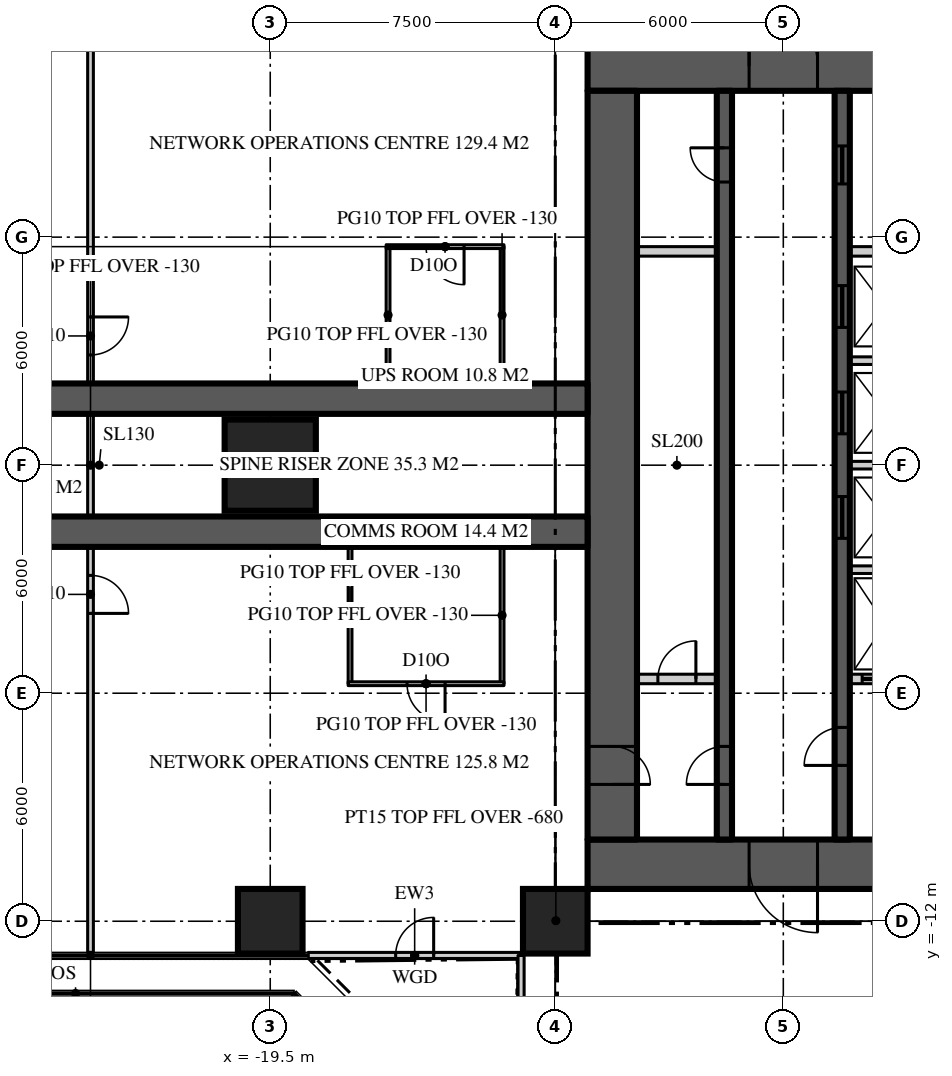
"""IFC4 building model, lengths in metres.
Left out: names, types, materials, properties, quantities, classifications, styles, units other than length and angle.
Written with IfcOpenShell. Run it as: python <this file> out.ifc"""

import sys

from ifc_helpers import new_model, si_unit, direction, frame, frame_2d, origin, origin_2d, place, context, subcontext, project, spatial, rectangle, extrude, element, fill, save


model = new_model("IFC4")
c1 = context("Model", 3, precision=1e-05, world=origin(), true_north=direction((0.0, 1.0)))
c2 = subcontext(c1, "Body", "Model", "MODEL_VIEW")
j1 = project(units=[si_unit("LENGTHUNIT", "METRE"), si_unit("PLANEANGLEUNIT", "RADIAN")], contexts=[c1])
p1 = place(None, origin())
s1 = spatial("IfcSite", under=j1, at=p1, CompositionType="ELEMENT")
p2 = place(p1, origin())
s2 = spatial("IfcBuilding", under=s1, at=p2, CompositionType="ELEMENT")
p3 = place(p2, frame((0.0, 0.0, 155.4)))
s3 = spatial("IfcBuildingStorey", under=s2, at=p3, CompositionType="ELEMENT", Elevation=155.4)
p4 = place(p3, frame((-11.15, 10.5, 0.0), z_axis=(0.0, 0.0, 1.0), x_axis=(1.0, 0.0, 0.0)))
e1 = element("IfcWall", 1, at=p4, inside=s3, PredefinedType="SHEAR", context=c2, shape_type="SweptSolid", body=[
    extrude(rectangle(XDim=22.3, YDim=1.3, at=frame_2d((11.15, 0.0))), origin(), (0.0, 0.0, 1.0), 3.9),
])
p5 = place(p4, frame((4.25, 0.0, 0.0)))
e2 = element("IfcOpeningElement", 2, at=p5, cuts=e1, PredefinedType="OPENING", context=c2, shape_type="SweptSolid", body=[
    extrude(rectangle(XDim=1.8, YDim=2.2, at=frame_2d((0.9, 1.1))), frame((0.0, 0.66, 0.0), z_axis=(0.0, -1.0, 0.0), x_axis=(1.0, 0.0, 0.0)), (0.0, 0.0, 1.0), 1.32),
])
p6 = place(p4, frame((16.25, 0.0, 0.0)))
e3 = element("IfcOpeningElement", 3, at=p6, cuts=e1, PredefinedType="OPENING", context=c2, shape_type="SweptSolid", body=[
    extrude(rectangle(XDim=1.8, YDim=2.2, at=frame_2d((0.9, 1.1))), frame((0.0, 0.66, 0.0), z_axis=(0.0, -1.0, 0.0), x_axis=(1.0, 0.0, 0.0)), (0.0, 0.0, 1.0), 1.32),
])
p7 = place(p3, frame((11.15, -10.5, 0.0), z_axis=(0.0, 0.0, 1.0), x_axis=(-1.0, 0.0, 0.0)))
e4 = element("IfcWall", 4, at=p7, inside=s3, PredefinedType="SHEAR", context=c2, shape_type="SweptSolid", body=[
    extrude(rectangle(XDim=22.3, YDim=1.3, at=frame_2d((11.15, 0.0))), origin(), (0.0, 0.0, 1.0), 3.9),
])
p8 = place(p7, frame((16.25, 0.0, 0.0)))
e5 = element("IfcOpeningElement", 5, at=p8, cuts=e4, PredefinedType="OPENING", context=c2, shape_type="SweptSolid", body=[
    extrude(rectangle(XDim=1.8, YDim=2.2, at=frame_2d((0.9, 1.1))), frame((0.0, 0.66, 0.0), z_axis=(0.0, -1.0, 0.0), x_axis=(1.0, 0.0, 0.0)), (0.0, 0.0, 1.0), 1.32),
])
p9 = place(p7, frame((4.25, 0.0, 0.0)))
e6 = element("IfcOpeningElement", 6, at=p9, cuts=e4, PredefinedType="OPENING", context=c2, shape_type="SweptSolid", body=[
    extrude(rectangle(XDim=1.8, YDim=2.2, at=frame_2d((0.9, 1.1))), frame((0.0, 0.66, 0.0), z_axis=(0.0, -1.0, 0.0), x_axis=(1.0, 0.0, 0.0)), (0.0, 0.0, 1.0), 1.32),
])
p10 = place(p3, frame((-10.5, 9.85, 0.0), z_axis=(0.0, 0.0, 1.0), x_axis=(0.0, -1.0, 0.0)))
e7 = element("IfcWall", 7, at=p10, inside=s3, PredefinedType="SHEAR", context=c2, shape_type="SweptSolid", body=[
    extrude(rectangle(XDim=19.7, YDim=1.3, at=frame_2d((9.85, 0.0))), origin(), (0.0, 0.0, 1.0), 3.9),
])
p11 = place(p10, frame((17.25, 0.0, 0.0)))
e8 = element("IfcOpeningElement", 8, at=p11, cuts=e7, PredefinedType="OPENING", context=c2, shape_type="SweptSolid", body=[
    extrude(rectangle(XDim=1.0, YDim=2.2, at=frame_2d((0.5, 1.1))), frame((0.0, 0.66, 0.0), z_axis=(0.0, -1.0, 0.0), x_axis=(1.0, 0.0, 0.0)), (0.0, 0.0, 1.0), 1.32),
])
for number, where, z_axis, x_axis in (
    (9, (-11.15, 1.75, 0.0), (0.0, 0.0, 1.0), (-1.0, 0.0, 0.0)),
    (10, (-11.15, -1.75, 0.0), (0.0, 0.0, 1.0), (-1.0, 0.0, 0.0)),
):
    element("IfcWall", number, at=place(p3, frame(where, z_axis=z_axis, x_axis=x_axis)), inside=s3, PredefinedType="SHEAR", context=c2, shape_type="SweptSolid", body=[
        extrude(rectangle(XDim=15.25, YDim=0.8, at=frame_2d((7.625, 0.0))), origin(), (0.0, 0.0, 1.0), 3.9),
    ])
for number, where, z_axis, x_axis in (
    (11, (-19.5, -12.0, 0.0), (0.0, 0.0, 1.0), (1.0, 0.0, 0.0)),
    (12, (-12.0, -12.0, 0.0), (0.0, 0.0, 1.0), (1.0, 0.0, 0.0)),
):
    element("IfcColumn", number, at=place(p3, frame(where, z_axis=z_axis, x_axis=x_axis)), inside=s3, PredefinedType="COLUMN", context=c2, shape_type="SweptSolid", body=[
        extrude(rectangle(XDim=1.7, YDim=1.7, at=origin_2d()), origin(), (0.0, 0.0, 1.0), 3.9),
    ])
p12 = place(p3, frame((-19.5, 0.0, 0.0), z_axis=(0.0, 0.0, 1.0), x_axis=(1.0, 0.0, 0.0)))
e13 = element("IfcColumn", 13, at=p12, inside=s3, PredefinedType="COLUMN", context=c2, shape_type="SweptSolid", body=[
    extrude(rectangle(XDim=2.4, YDim=2.4, at=origin_2d()), origin(), (0.0, 0.0, 1.0), 3.9),
])
p13 = place(p3, frame((-18.5, -12.9, 0.0), z_axis=(0.0, 0.0, 1.0), x_axis=(1.0, 0.0, 0.0)))
e14 = element("IfcWall", 14, at=p13, inside=s3, PredefinedType="SOLIDWALL", context=c2, shape_type="SweptSolid", body=[
    extrude(rectangle(XDim=5.6, YDim=0.16, at=frame_2d((2.8, 0.0))), origin(), (0.0, 0.0, 1.0), 3.77),
])
p14 = place(p13, frame((2.3, 0.0, 0.0)))
e15 = element("IfcOpeningElement", 15, at=p14, cuts=e14, PredefinedType="OPENING", context=c2, shape_type="SweptSolid", body=[
    extrude(rectangle(XDim=1.0, YDim=2.2, at=frame_2d((0.5, 1.1))), frame((0.0, 0.09, 0.0), z_axis=(0.0, -1.0, 0.0), x_axis=(1.0, 0.0, 0.0)), (0.0, 0.0, 1.0), 0.18),
])
p15 = place(p3, frame((-12.9, -12.9, 0.0), z_axis=(0.0, 0.0, 1.0), x_axis=(0.0, -1.0, 0.0)))
e16 = element("IfcWall", 16, at=p15, inside=s3, PredefinedType="SOLIDWALL", context=c2, shape_type="SweptSolid", body=[
    extrude(rectangle(XDim=5.6, YDim=0.16, at=frame_2d((2.8, 0.0))), origin(), (0.0, 0.0, 1.0), 3.77),
])
p16 = place(p3, frame((-7.55, -9.85, 0.0), z_axis=(0.0, 0.0, 1.0), x_axis=(0.0, 1.0, 0.0)))
e17 = element("IfcWall", 17, at=p16, inside=s3, PredefinedType="SHEAR", context=c2, shape_type="SweptSolid", body=[
    extrude(rectangle(XDim=19.7, YDim=0.4, at=frame_2d((9.85, 0.0))), origin(), (0.0, 0.0, 1.0), 3.9),
])
p17 = place(p16, frame((1.45, 0.0, 0.0)))
e18 = element("IfcOpeningElement", 18, at=p17, cuts=e17, PredefinedType="OPENING", context=c2, shape_type="SweptSolid", body=[
    extrude(rectangle(XDim=1.0, YDim=2.2, at=frame_2d((0.5, 1.1))), frame((0.0, 0.21, 0.0), z_axis=(0.0, -1.0, 0.0), x_axis=(1.0, 0.0, 0.0)), (0.0, 0.0, 1.0), 0.42),
])
p18 = place(p16, frame((17.3, 0.0, 0.0)))
e19 = element("IfcOpeningElement", 19, at=p18, cuts=e17, PredefinedType="OPENING", context=c2, shape_type="SweptSolid", body=[
    extrude(rectangle(XDim=0.9, YDim=2.1, at=frame_2d((0.45, 1.05))), frame((0.0, 0.21, 0.0), z_axis=(0.0, -1.0, 0.0), x_axis=(1.0, 0.0, 0.0)), (0.0, 0.0, 1.0), 0.42),
])
p19 = place(p3, frame((-4.45, -9.85, 0.0), z_axis=(0.0, 0.0, 1.0), x_axis=(0.0, 1.0, 0.0)))
e20 = element("IfcWall", 20, at=p19, inside=s3, PredefinedType="SHEAR", context=c2, shape_type="SweptSolid", body=[
    extrude(rectangle(XDim=19.7, YDim=0.4, at=frame_2d((9.85, 0.0))), origin(), (0.0, 0.0, 1.0), 3.9),
])
p20 = place(p19, frame((1.95, 0.0, 0.0)))
e21 = element("IfcOpeningElement", 21, at=p20, cuts=e20, PredefinedType="OPENING", context=c2, shape_type="SweptSolid", body=[
    extrude(rectangle(XDim=1.0, YDim=2.2, at=frame_2d((0.5, 1.1))), frame((0.0, 0.21, 0.0), z_axis=(0.0, -1.0, 0.0), x_axis=(1.0, 0.0, 0.0)), (0.0, 0.0, 1.0), 0.42),
])
p21 = place(p19, frame((17.25, 0.0, 0.0)))
e22 = element("IfcOpeningElement", 22, at=p21, cuts=e20, PredefinedType="OPENING", context=c2, shape_type="SweptSolid", body=[
    extrude(rectangle(XDim=1.0, YDim=2.1, at=frame_2d((0.5, 1.05))), frame((0.0, 0.21, 0.0), z_axis=(0.0, -1.0, 0.0), x_axis=(1.0, 0.0, 0.0)), (0.0, 0.0, 1.0), 0.42),
])
p22 = place(p19, frame((7.925, 0.0, 0.0)))
e23 = element("IfcOpeningElement", 23, at=p22, cuts=e20, PredefinedType="OPENING", context=c2, shape_type="SweptSolid", body=[
    extrude(rectangle(XDim=1.1, YDim=2.2, at=frame_2d((0.55, 1.1))), frame((0.0, 0.21, 0.0), z_axis=(0.0, -1.0, 0.0), x_axis=(1.0, 0.0, 0.0)), (0.0, 0.0, 1.0), 0.42),
])
p23 = place(p19, frame((10.675, 0.0, 0.0)))
e24 = element("IfcOpeningElement", 24, at=p23, cuts=e20, PredefinedType="OPENING", context=c2, shape_type="SweptSolid", body=[
    extrude(rectangle(XDim=1.1, YDim=2.2, at=frame_2d((0.55, 1.1))), frame((0.0, 0.21, 0.0), z_axis=(0.0, -1.0, 0.0), x_axis=(1.0, 0.0, 0.0)), (0.0, 0.0, 1.0), 0.42),
])
p24 = place(p19, frame((13.475, 0.0, 0.0)))
e25 = element("IfcOpeningElement", 25, at=p24, cuts=e20, PredefinedType="OPENING", context=c2, shape_type="SweptSolid", body=[
    extrude(rectangle(XDim=1.1, YDim=2.2, at=frame_2d((0.55, 1.1))), frame((0.0, 0.21, 0.0), z_axis=(0.0, -1.0, 0.0), x_axis=(1.0, 0.0, 0.0)), (0.0, 0.0, 1.0), 0.42),
])
p25 = place(p3, frame((-9.85, 5.625, 0.0), z_axis=(0.0, 0.0, 1.0), x_axis=(1.0, 0.0, 0.0)))
e26 = element("IfcWall", 26, at=p25, inside=s3, PredefinedType="SOLIDWALL", context=c2, shape_type="SweptSolid", body=[
    extrude(rectangle(XDim=2.1, YDim=0.25, at=frame_2d((1.05, 0.0))), origin(), (0.0, 0.0, 1.0), 3.7),
])
p26 = place(p3, frame((-4.25, 5.625, 0.0), z_axis=(0.0, 0.0, 1.0), x_axis=(1.0, 0.0, 0.0)))
e27 = element("IfcWall", 27, at=p26, inside=s3, PredefinedType="SOLIDWALL", context=c2, shape_type="SweptSolid", body=[
    extrude(rectangle(XDim=1.85, YDim=0.25, at=frame_2d((0.925, 0.0))), origin(), (0.0, 0.0, 1.0), 3.7),
])
p27 = place(p3, frame((-9.85, -5.625, 0.0), z_axis=(0.0, 0.0, 1.0), x_axis=(1.0, 0.0, 0.0)))
e28 = element("IfcWall", 28, at=p27, inside=s3, PredefinedType="SOLIDWALL", context=c2, shape_type="SweptSolid", body=[
    extrude(rectangle(XDim=2.1, YDim=0.25, at=frame_2d((1.05, 0.0))), origin(), (0.0, 0.0, 1.0), 3.7),
])
p28 = place(p27, frame((0.55, 0.0, 0.0)))
e29 = element("IfcOpeningElement", 29, at=p28, cuts=e28, PredefinedType="OPENING", context=c2, shape_type="SweptSolid", body=[
    extrude(rectangle(XDim=1.0, YDim=2.2, at=frame_2d((0.5, 1.1))), frame((0.0, 0.135, 0.0), z_axis=(0.0, -1.0, 0.0), x_axis=(1.0, 0.0, 0.0)), (0.0, 0.0, 1.0), 0.27),
])
p29 = place(p3, frame((-4.25, -5.625, 0.0), z_axis=(0.0, 0.0, 1.0), x_axis=(1.0, 0.0, 0.0)))
e30 = element("IfcWall", 30, at=p29, inside=s3, PredefinedType="SOLIDWALL", context=c2, shape_type="SweptSolid", body=[
    extrude(rectangle(XDim=1.85, YDim=0.25, at=frame_2d((0.925, 0.0))), origin(), (0.0, 0.0, 1.0), 3.7),
])
p30 = place(p29, frame((0.325, 0.0, 0.0)))
e31 = element("IfcOpeningElement", 31, at=p30, cuts=e30, PredefinedType="OPENING", context=c2, shape_type="SweptSolid", body=[
    extrude(rectangle(XDim=1.2, YDim=2.2, at=frame_2d((0.6, 1.1))), frame((0.0, 0.135, 0.0), z_axis=(0.0, -1.0, 0.0), x_axis=(1.0, 0.0, 0.0)), (0.0, 0.0, 1.0), 0.27),
])
for number, where, z_axis, x_axis in (
    (32, (-4.25, -2.75, 0.0), (0.0, 0.0, 1.0), (1.0, 0.0, 0.0)),
    (33, (-4.25, 0.0, 0.0), (0.0, 0.0, 1.0), (1.0, 0.0, 0.0)),
    (34, (-4.25, 2.75, 0.0), (0.0, 0.0, 1.0), (1.0, 0.0, 0.0)),
):
    element("IfcWall", number, at=place(p3, frame(where, z_axis=z_axis, x_axis=x_axis)), inside=s3, PredefinedType="SOLIDWALL", context=c2, shape_type="SweptSolid", body=[
        extrude(rectangle(XDim=1.85, YDim=0.2, at=frame_2d((0.925, 0.0))), origin(), (0.0, 0.0, 1.0), 3.7),
    ])
p31 = place(p3, frame((-24.229, 12.82, 0.0), z_axis=(0.0, 0.0, 1.0), x_axis=(0.0, -1.0, 0.0)))
e35 = element("IfcWall", 35, at=p31, inside=s3, PredefinedType="PARTITIONING", context=c2, shape_type="SweptSolid", body=[
    extrude(rectangle(XDim=25.64, YDim=0.15, at=frame_2d((12.82, 0.0))), origin(), (0.0, 0.0, 1.0), 3.77),
])
p32 = place(p31, frame((15.72, 0.0, 0.0)))
e36 = element("IfcOpeningElement", 36, at=p32, cuts=e35, PredefinedType="OPENING", context=c2, shape_type="SweptSolid", body=[
    extrude(rectangle(XDim=1.0, YDim=2.2, at=frame_2d((0.5, 1.1))), frame((0.0, 0.085, 0.0), z_axis=(0.0, -1.0, 0.0), x_axis=(1.0, 0.0, 0.0)), (0.0, 0.0, 1.0), 0.17),
])
p33 = place(p31, frame((8.92, 0.0, 0.0)))
e37 = element("IfcOpeningElement", 37, at=p33, cuts=e35, PredefinedType="OPENING", context=c2, shape_type="SweptSolid", body=[
    extrude(rectangle(XDim=1.0, YDim=2.2, at=frame_2d((0.5, 1.1))), frame((0.0, 0.085, 0.0), z_axis=(0.0, -1.0, 0.0), x_axis=(1.0, 0.0, 0.0)), (0.0, 0.0, 1.0), 0.17),
])
for number, where, z_axis, x_axis in (
    (38, (-13.4, -2.15, 0.0), (0.0, 0.0, 1.0), (0.0, -1.0, 0.0)),
    (39, (-17.4, -2.15, 0.0), (0.0, 0.0, 1.0), (0.0, -1.0, 0.0)),
):
    element("IfcWall", number, at=place(p3, frame(where, z_axis=z_axis, x_axis=x_axis)), inside=s3, PredefinedType="PARTITIONING", context=c2, shape_type="SweptSolid", body=[
        extrude(rectangle(XDim=3.6, YDim=0.1, at=frame_2d((1.8, 0.0))), origin(), (0.0, 0.0, 1.0), 3.77),
    ])
p34 = place(p3, frame((-13.35, -5.75, 0.0), z_axis=(0.0, 0.0, 1.0), x_axis=(-1.0, 0.0, 0.0)))
e40 = element("IfcWall", 40, at=p34, inside=s3, PredefinedType="PARTITIONING", context=c2, shape_type="SweptSolid", body=[
    extrude(rectangle(XDim=4.1, YDim=0.1, at=frame_2d((2.05, 0.0))), origin(), (0.0, 0.0, 1.0), 3.77),
])
p35 = place(p34, frame((1.55, 0.0, 0.0)))
e41 = element("IfcOpeningElement", 41, at=p35, cuts=e40, PredefinedType="OPENING", context=c2, shape_type="SweptSolid", body=[
    extrude(rectangle(XDim=1.0, YDim=2.2, at=frame_2d((0.5, 1.1))), frame((0.0, 0.06, 0.0), z_axis=(0.0, -1.0, 0.0), x_axis=(1.0, 0.0, 0.0)), (0.0, 0.0, 1.0), 0.12),
])
for number, where, z_axis, x_axis in (
    (42, (-13.4, 2.15, 0.0), (0.0, 0.0, 1.0), (0.0, 1.0, 0.0)),
    (43, (-16.4, 2.15, 0.0), (0.0, 0.0, 1.0), (0.0, 1.0, 0.0)),
):
    element("IfcWall", number, at=place(p3, frame(where, z_axis=z_axis, x_axis=x_axis)), inside=s3, PredefinedType="PARTITIONING", context=c2, shape_type="SweptSolid", body=[
        extrude(rectangle(XDim=3.6, YDim=0.1, at=frame_2d((1.8, 0.0))), origin(), (0.0, 0.0, 1.0), 3.77),
    ])
p36 = place(p3, frame((-13.35, 5.75, 0.0), z_axis=(0.0, 0.0, 1.0), x_axis=(-1.0, 0.0, 0.0)))
e44 = element("IfcWall", 44, at=p36, inside=s3, PredefinedType="PARTITIONING", context=c2, shape_type="SweptSolid", body=[
    extrude(rectangle(XDim=3.1, YDim=0.1, at=frame_2d((1.55, 0.0))), origin(), (0.0, 0.0, 1.0), 3.77),
])
p37 = place(p36, frame((1.05, 0.0, 0.0)))
e45 = element("IfcOpeningElement", 45, at=p37, cuts=e44, PredefinedType="OPENING", context=c2, shape_type="SweptSolid", body=[
    extrude(rectangle(XDim=1.0, YDim=2.2, at=frame_2d((0.5, 1.1))), frame((0.0, 0.06, 0.0), z_axis=(0.0, -1.0, 0.0), x_axis=(1.0, 0.0, 0.0)), (0.0, 0.0, 1.0), 0.12),
])
p38 = place(p3, frame((-11.15, -11.15, 0.0), z_axis=(0.0, 0.0, 1.0), x_axis=(-0.707106781187, -0.707106781187, 0.0)))
e46 = element("IfcWall", 46, at=p38, inside=s3, PredefinedType="PARTITIONING", context=c2, shape_type="SweptSolid", body=[
    extrude(rectangle(XDim=2.362, YDim=0.15, at=frame_2d((1.181, 0.0))), origin(), (0.0, 0.0, 1.0), 3.22),
])
p39 = place(p14, origin())
e47 = element("IfcDoor", 47, at=p39, inside=s3, OperationType="SINGLE_SWING_RIGHT", PredefinedType="DOOR", context=c2, shape_type="SweptSolid", body=[
    extrude(rectangle(XDim=1.0, YDim=2.2, at=frame_2d((0.5, 1.1))), frame((0.0, 0.025, 0.0), z_axis=(0.0, -1.0, 0.0), x_axis=(1.0, 0.0, 0.0)), (0.0, 0.0, 1.0), 0.05),
])
fill(e15, e47)
p40 = place(p5, origin())
e48 = element("IfcDoor", 48, at=p40, inside=s3, OperationType="DOUBLE_DOOR_DOUBLE_SWING", PredefinedType="DOOR", context=c2, shape_type="SweptSolid", body=[
    extrude(rectangle(XDim=1.8, YDim=2.2, at=frame_2d((0.9, 1.1))), frame((0.0, 0.025, 0.0), z_axis=(0.0, -1.0, 0.0), x_axis=(1.0, 0.0, 0.0)), (0.0, 0.0, 1.0), 0.05),
])
fill(e2, e48)
p41 = place(p8, origin())
e49 = element("IfcDoor", 49, at=p41, inside=s3, OperationType="DOUBLE_DOOR_DOUBLE_SWING", PredefinedType="DOOR", context=c2, shape_type="SweptSolid", body=[
    extrude(rectangle(XDim=1.8, YDim=2.2, at=frame_2d((0.9, 1.1))), frame((0.0, 0.025, 0.0), z_axis=(0.0, -1.0, 0.0), x_axis=(1.0, 0.0, 0.0)), (0.0, 0.0, 1.0), 0.05),
])
fill(e5, e49)
p42 = place(p17, origin())
e50 = element("IfcDoor", 50, at=p42, inside=s3, OperationType="SINGLE_SWING_LEFT", PredefinedType="DOOR", context=c2, shape_type="SweptSolid", body=[
    extrude(rectangle(XDim=1.0, YDim=2.2, at=frame_2d((0.5, 1.1))), frame((0.0, 0.025, 0.0), z_axis=(0.0, -1.0, 0.0), x_axis=(1.0, 0.0, 0.0)), (0.0, 0.0, 1.0), 0.05),
])
fill(e18, e50)
p43 = place(p11, origin())
e51 = element("IfcDoor", 51, at=p43, inside=s3, OperationType="SINGLE_SWING_RIGHT", PredefinedType="DOOR", context=c2, shape_type="SweptSolid", body=[
    extrude(rectangle(XDim=1.0, YDim=2.2, at=frame_2d((0.5, 1.1))), frame((0.0, 0.025, 0.0), z_axis=(0.0, -1.0, 0.0), x_axis=(1.0, 0.0, 0.0)), (0.0, 0.0, 1.0), 0.05),
])
fill(e8, e51)
p44 = place(p20, origin())
e52 = element("IfcDoor", 52, at=p44, inside=s3, OperationType="SINGLE_SWING_LEFT", PredefinedType="DOOR", context=c2, shape_type="SweptSolid", body=[
    extrude(rectangle(XDim=1.0, YDim=2.2, at=frame_2d((0.5, 1.1))), frame((0.0, 0.025, 0.0), z_axis=(0.0, -1.0, 0.0), x_axis=(1.0, 0.0, 0.0)), (0.0, 0.0, 1.0), 0.05),
])
fill(e21, e52)
p45 = place(p18, origin())
e53 = element("IfcDoor", 53, at=p45, inside=s3, OperationType="SINGLE_SWING_RIGHT", PredefinedType="DOOR", context=c2, shape_type="SweptSolid", body=[
    extrude(rectangle(XDim=0.9, YDim=2.1, at=frame_2d((0.45, 1.05))), frame((0.0, 0.025, 0.0), z_axis=(0.0, -1.0, 0.0), x_axis=(1.0, 0.0, 0.0)), (0.0, 0.0, 1.0), 0.05),
])
fill(e19, e53)
p46 = place(p21, origin())
e54 = element("IfcDoor", 54, at=p46, inside=s3, OperationType="SLIDING_TO_LEFT", PredefinedType="DOOR", context=c2, shape_type="SweptSolid", body=[
    extrude(rectangle(XDim=1.0, YDim=2.1, at=frame_2d((0.5, 1.05))), frame((0.0, 0.025, 0.0), z_axis=(0.0, -1.0, 0.0), x_axis=(1.0, 0.0, 0.0)), (0.0, 0.0, 1.0), 0.05),
])
fill(e22, e54)
p47 = place(p22, origin())
e55 = element("IfcDoor", 55, at=p47, inside=s3, OperationType="SLIDING_TO_LEFT", PredefinedType="DOOR", context=c2, shape_type="SweptSolid", body=[
    extrude(rectangle(XDim=1.1, YDim=2.2, at=frame_2d((0.55, 1.1))), frame((0.0, 0.025, 0.0), z_axis=(0.0, -1.0, 0.0), x_axis=(1.0, 0.0, 0.0)), (0.0, 0.0, 1.0), 0.05),
])
fill(e23, e55)
p48 = place(p23, origin())
e56 = element("IfcDoor", 56, at=p48, inside=s3, OperationType="SLIDING_TO_LEFT", PredefinedType="DOOR", context=c2, shape_type="SweptSolid", body=[
    extrude(rectangle(XDim=1.1, YDim=2.2, at=frame_2d((0.55, 1.1))), frame((0.0, 0.025, 0.0), z_axis=(0.0, -1.0, 0.0), x_axis=(1.0, 0.0, 0.0)), (0.0, 0.0, 1.0), 0.05),
])
fill(e24, e56)
p49 = place(p24, origin())
e57 = element("IfcDoor", 57, at=p49, inside=s3, OperationType="SLIDING_TO_LEFT", PredefinedType="DOOR", context=c2, shape_type="SweptSolid", body=[
    extrude(rectangle(XDim=1.1, YDim=2.2, at=frame_2d((0.55, 1.1))), frame((0.0, 0.025, 0.0), z_axis=(0.0, -1.0, 0.0), x_axis=(1.0, 0.0, 0.0)), (0.0, 0.0, 1.0), 0.05),
])
fill(e25, e57)
p50 = place(p30, origin())
e58 = element("IfcDoor", 58, at=p50, inside=s3, OperationType="SLIDING_TO_LEFT", PredefinedType="DOOR", context=c2, shape_type="SweptSolid", body=[
    extrude(rectangle(XDim=1.2, YDim=2.2, at=frame_2d((0.6, 1.1))), frame((0.0, 0.025, 0.0), z_axis=(0.0, -1.0, 0.0), x_axis=(1.0, 0.0, 0.0)), (0.0, 0.0, 1.0), 0.05),
])
fill(e31, e58)
p51 = place(p32, origin())
e59 = element("IfcDoor", 59, at=p51, inside=s3, OperationType="SINGLE_SWING_RIGHT", PredefinedType="DOOR", context=c2, shape_type="SweptSolid", body=[
    extrude(rectangle(XDim=1.0, YDim=2.2, at=frame_2d((0.5, 1.1))), frame((0.0, 0.025, 0.0), z_axis=(0.0, -1.0, 0.0), x_axis=(1.0, 0.0, 0.0)), (0.0, 0.0, 1.0), 0.05),
])
fill(e36, e59)
p52 = place(p33, origin())
e60 = element("IfcDoor", 60, at=p52, inside=s3, OperationType="SINGLE_SWING_LEFT", PredefinedType="DOOR", context=c2, shape_type="SweptSolid", body=[
    extrude(rectangle(XDim=1.0, YDim=2.2, at=frame_2d((0.5, 1.1))), frame((0.0, 0.025, 0.0), z_axis=(0.0, -1.0, 0.0), x_axis=(1.0, 0.0, 0.0)), (0.0, 0.0, 1.0), 0.05),
])
fill(e37, e60)
p53 = place(p35, origin())
e61 = element("IfcDoor", 61, at=p53, inside=s3, OperationType="SINGLE_SWING_LEFT", PredefinedType="DOOR", context=c2, shape_type="SweptSolid", body=[
    extrude(rectangle(XDim=1.0, YDim=2.2, at=frame_2d((0.5, 1.1))), frame((0.0, 0.025, 0.0), z_axis=(0.0, -1.0, 0.0), x_axis=(1.0, 0.0, 0.0)), (0.0, 0.0, 1.0), 0.05),
])
fill(e41, e61)
p54 = place(p37, origin())
e62 = element("IfcDoor", 62, at=p54, inside=s3, OperationType="SINGLE_SWING_LEFT", PredefinedType="DOOR", context=c2, shape_type="SweptSolid", body=[
    extrude(rectangle(XDim=1.0, YDim=2.2, at=frame_2d((0.5, 1.1))), frame((0.0, 0.025, 0.0), z_axis=(0.0, -1.0, 0.0), x_axis=(1.0, 0.0, 0.0)), (0.0, 0.0, 1.0), 0.05),
])
fill(e45, e62)
p55 = place(p28, origin())
e63 = element("IfcDoor", 63, at=p55, inside=s3, OperationType="SINGLE_SWING_RIGHT", PredefinedType="DOOR", context=c2, shape_type="SweptSolid", body=[
    extrude(rectangle(XDim=1.0, YDim=2.2, at=frame_2d((0.5, 1.1))), frame((0.0, 0.025, 0.0), z_axis=(0.0, -1.0, 0.0), x_axis=(1.0, 0.0, 0.0)), (0.0, 0.0, 1.0), 0.05),
])
fill(e29, e63)
save(model, sys.argv[1])
